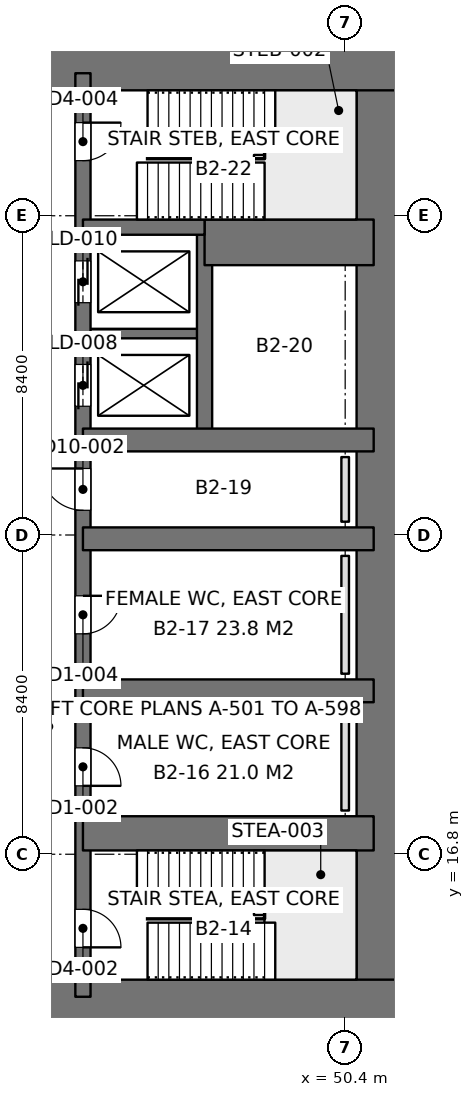
"""IFC4 building model, lengths in metres.
Left out: names, types, materials, properties, quantities, classifications, styles, units other than length and angle.
Written with IfcOpenShell. Run it as: python <this file> out.ifc"""

import sys

from ifc_helpers import new_model, si_unit, direction, frame, frame_2d, origin, place, context, subcontext, project, spatial, rectangle, extrude, element, fill, save


model = new_model("IFC4")
c1 = context("Model", 3, precision=1e-05, world=origin(), true_north=direction((0.0, 1.0)))
c2 = subcontext(c1, "Body", "Model", "MODEL_VIEW")
j1 = project(units=[si_unit("LENGTHUNIT", "METRE"), si_unit("PLANEANGLEUNIT", "RADIAN")], contexts=[c1])
p1 = place(None, origin())
s1 = spatial("IfcSite", under=j1, at=p1, CompositionType="ELEMENT")
p2 = place(p1, origin())
s2 = spatial("IfcBuilding", under=s1, at=p2, CompositionType="ELEMENT")
p3 = place(p2, frame((0.0, 0.0, -8.4)))
s3 = spatial("IfcBuildingStorey", under=s2, at=p3, CompositionType="ELEMENT", Elevation=-8.4)
p4 = place(p3, frame((33.0, 12.75, 0.0), z_axis=(0.0, 0.0, 1.0), x_axis=(1.0, 0.0, 0.0)))
e1 = element("IfcWall", 1, at=p4, inside=s3, PredefinedType="SHEAR", context=c2, shape_type="SweptSolid", body=[
    extrude(rectangle(XDim=19.2, YDim=1.5, at=frame_2d((9.6, 0.0))), origin(), (0.0, 0.0, 1.0), 4.2),
])
p5 = place(p4, frame((7.85, 0.0, 0.0)))
e2 = element("IfcOpeningElement", 2, at=p5, cuts=e1, PredefinedType="OPENING", context=c2, shape_type="SweptSolid", body=[
    extrude(rectangle(XDim=1.8, YDim=2.4, at=frame_2d((0.9, 1.2))), frame((0.0, 0.76, 0.0), z_axis=(0.0, -1.0, 0.0), x_axis=(1.0, 0.0, 0.0)), (0.0, 0.0, 1.0), 1.52),
])
p6 = place(p3, frame((33.0, 37.65, 0.0), z_axis=(0.0, 0.0, 1.0), x_axis=(1.0, 0.0, 0.0)))
e3 = element("IfcWall", 3, at=p6, inside=s3, PredefinedType="SHEAR", context=c2, shape_type="SweptSolid", body=[
    extrude(rectangle(XDim=19.2, YDim=1.5, at=frame_2d((9.6, 0.0))), origin(), (0.0, 0.0, 1.0), 4.2),
])
p7 = place(p6, frame((7.85, 0.0, 0.0)))
e4 = element("IfcOpeningElement", 4, at=p7, cuts=e3, PredefinedType="OPENING", context=c2, shape_type="SweptSolid", body=[
    extrude(rectangle(XDim=1.8, YDim=2.4, at=frame_2d((0.9, 1.2))), frame((0.0, 0.76, 0.0), z_axis=(0.0, -1.0, 0.0), x_axis=(1.0, 0.0, 0.0)), (0.0, 0.0, 1.0), 1.52),
])
p8 = place(p3, frame((51.45, 12.75, 0.0), z_axis=(0.0, 0.0, 1.0), x_axis=(0.0, 1.0, 0.0)))
e5 = element("IfcWall", 5, at=p8, inside=s3, PredefinedType="SHEAR", context=c2, shape_type="SweptSolid", body=[
    extrude(rectangle(XDim=24.9, YDim=1.5, at=frame_2d((12.45, 0.0))), origin(), (0.0, 0.0, 1.0), 4.2),
])
p9 = place(p3, frame((43.5, 13.05, 0.0), z_axis=(0.0, 0.0, 1.0), x_axis=(0.0, 1.0, 0.0)))
e6 = element("IfcWall", 6, at=p9, inside=s3, PredefinedType="SHEAR", context=c2, shape_type="SweptSolid", body=[
    extrude(rectangle(XDim=24.3, YDim=0.4, at=frame_2d((12.15, 0.0))), origin(), (0.0, 0.0, 1.0), 4.2),
])
p10 = place(p9, frame((1.3, 0.0, 0.0)))
e7 = element("IfcOpeningElement", 7, at=p10, cuts=e6, PredefinedType="OPENING", context=c2, shape_type="SweptSolid", body=[
    extrude(rectangle(XDim=1.0, YDim=2.2, at=frame_2d((0.5, 1.1))), frame((0.0, 0.21, 0.0), z_axis=(0.0, -1.0, 0.0), x_axis=(1.0, 0.0, 0.0)), (0.0, 0.0, 1.0), 0.42),
])
p11 = place(p9, frame((22.0, 0.0, 0.0)))
e8 = element("IfcOpeningElement", 8, at=p11, cuts=e6, PredefinedType="OPENING", context=c2, shape_type="SweptSolid", body=[
    extrude(rectangle(XDim=1.0, YDim=2.2, at=frame_2d((0.5, 1.1))), frame((0.0, 0.21, 0.0), z_axis=(0.0, -1.0, 0.0), x_axis=(1.0, 0.0, 0.0)), (0.0, 0.0, 1.0), 0.42),
])
p12 = place(p9, frame((5.55, 0.0, 0.0)))
e9 = element("IfcOpeningElement", 9, at=p12, cuts=e6, PredefinedType="OPENING", context=c2, shape_type="SweptSolid", body=[
    extrude(rectangle(XDim=1.0, YDim=2.2, at=frame_2d((0.5, 1.1))), frame((0.0, 0.21, 0.0), z_axis=(0.0, -1.0, 0.0), x_axis=(1.0, 0.0, 0.0)), (0.0, 0.0, 1.0), 0.42),
])
p13 = place(p9, frame((9.55, 0.0, 0.0)))
e10 = element("IfcOpeningElement", 10, at=p13, cuts=e6, PredefinedType="OPENING", context=c2, shape_type="SweptSolid", body=[
    extrude(rectangle(XDim=1.0, YDim=2.2, at=frame_2d((0.5, 1.1))), frame((0.0, 0.21, 0.0), z_axis=(0.0, -1.0, 0.0), x_axis=(1.0, 0.0, 0.0)), (0.0, 0.0, 1.0), 0.42),
])
p14 = place(p9, frame((12.8, 0.0, 0.0)))
e11 = element("IfcOpeningElement", 11, at=p14, cuts=e6, PredefinedType="OPENING", context=c2, shape_type="SweptSolid", body=[
    extrude(rectangle(XDim=1.1, YDim=2.2, at=frame_2d((0.55, 1.1))), frame((0.0, 0.21, 0.0), z_axis=(0.0, -1.0, 0.0), x_axis=(1.0, 0.0, 0.0)), (0.0, 0.0, 1.0), 0.42),
])
p15 = place(p9, frame((15.538, 0.0, 0.0)))
e12 = element("IfcOpeningElement", 12, at=p15, cuts=e6, PredefinedType="OPENING", context=c2, shape_type="SweptSolid", body=[
    extrude(rectangle(XDim=1.1, YDim=2.2, at=frame_2d((0.55, 1.1))), frame((0.0, 0.21, 0.0), z_axis=(0.0, -1.0, 0.0), x_axis=(1.0, 0.0, 0.0)), (0.0, 0.0, 1.0), 0.42),
])
p16 = place(p9, frame((18.262, 0.0, 0.0)))
e13 = element("IfcOpeningElement", 13, at=p16, cuts=e6, PredefinedType="OPENING", context=c2, shape_type="SweptSolid", body=[
    extrude(rectangle(XDim=1.1, YDim=2.2, at=frame_2d((0.55, 1.1))), frame((0.0, 0.21, 0.0), z_axis=(0.0, -1.0, 0.0), x_axis=(1.0, 0.0, 0.0)), (0.0, 0.0, 1.0), 0.42),
])
p17 = place(p3, frame((51.15, 17.35, 0.0), z_axis=(0.0, 0.0, 1.0), x_axis=(-1.0, 0.0, 0.0)))
e14 = element("IfcWall", 14, at=p17, inside=s3, PredefinedType="SHEAR", context=c2, shape_type="SweptSolid", body=[
    extrude(rectangle(XDim=7.65, YDim=0.9, at=frame_2d((3.825, 0.0))), origin(), (0.0, 0.0, 1.0), 4.2),
])
for number, where, z_axis, x_axis in (
    (15, (51.15, 21.1, 0.0), (0.0, 0.0, 1.0), (-1.0, 0.0, 0.0)),
    (16, (51.15, 25.1, 0.0), (0.0, 0.0, 1.0), (-1.0, 0.0, 0.0)),
    (17, (51.15, 27.7, 0.0), (0.0, 0.0, 1.0), (-1.0, 0.0, 0.0)),
):
    element("IfcWall", number, at=place(p3, frame(where, z_axis=z_axis, x_axis=x_axis)), inside=s3, PredefinedType="SHEAR", context=c2, shape_type="SweptSolid", body=[
        extrude(rectangle(XDim=7.65, YDim=0.6, at=frame_2d((3.825, 0.0))), origin(), (0.0, 0.0, 1.0), 4.2),
    ])
p18 = place(p3, frame((51.15, 32.9, 0.0), z_axis=(0.0, 0.0, 1.0), x_axis=(-1.0, 0.0, 0.0)))
e18 = element("IfcWall", 18, at=p18, inside=s3, PredefinedType="SHEAR", context=c2, shape_type="SweptSolid", body=[
    extrude(rectangle(XDim=4.45, YDim=1.2, at=frame_2d((2.225, 0.0))), origin(), (0.0, 0.0, 1.0), 4.2),
])
p19 = place(p3, frame((46.7, 33.3, 0.0), z_axis=(0.0, 0.0, 1.0), x_axis=(-1.0, 0.0, 0.0)))
e19 = element("IfcWall", 19, at=p19, inside=s3, PredefinedType="SHEAR", context=c2, shape_type="SweptSolid", body=[
    extrude(rectangle(XDim=3.2, YDim=0.4, at=frame_2d((1.6, 0.0))), origin(), (0.0, 0.0, 1.0), 4.2),
])
p20 = place(p3, frame((46.7, 27.7, 0.0), z_axis=(0.0, 0.0, 1.0), x_axis=(0.0, 1.0, 0.0)))
e20 = element("IfcWall", 20, at=p20, inside=s3, PredefinedType="SHEAR", context=c2, shape_type="SweptSolid", body=[
    extrude(rectangle(XDim=5.6, YDim=0.4, at=frame_2d((2.8, 0.0))), origin(), (0.0, 0.0, 1.0), 4.2),
])
p21 = place(p3, frame((46.7, 30.5, 0.0), z_axis=(0.0, 0.0, 1.0), x_axis=(-1.0, 0.0, 0.0)))
e21 = element("IfcWall", 21, at=p21, inside=s3, PredefinedType="SHEAR", context=c2, shape_type="SweptSolid", body=[
    extrude(rectangle(XDim=3.2, YDim=0.25, at=frame_2d((1.6, 0.0))), origin(), (0.0, 0.0, 1.0), 4.2),
])
p22 = place(p3, frame((51.15, 9.049, 0.0), z_axis=(0.0, 0.0, 1.0), x_axis=(0.0, 1.0, 0.0)))
e22 = element("IfcWall", 22, at=p22, inside=s3, PredefinedType="PARTITIONING", context=c2, shape_type="SweptSolid", body=[
    extrude(rectangle(XDim=3.531, YDim=0.25, at=frame_2d((1.766, 0.0))), origin(), (0.0, 0.0, 1.0), 3.85),
])
p23 = place(p22, frame((1.001, 0.0, 0.0)))
e23 = element("IfcOpeningElement", 23, at=p23, cuts=e22, PredefinedType="OPENING", context=c2, shape_type="SweptSolid", body=[
    extrude(rectangle(XDim=0.9, YDim=2.2, at=frame_2d((0.45, 1.1))), frame((0.0, 0.135, 0.0), z_axis=(0.0, -1.0, 0.0), x_axis=(1.0, 0.0, 0.0)), (0.0, 0.0, 1.0), 0.27),
])
p24 = place(p3, frame((51.15, 37.82, 0.0), z_axis=(0.0, 0.0, 1.0), x_axis=(0.0, 1.0, 0.0)))
e24 = element("IfcWall", 24, at=p24, inside=s3, PredefinedType="PARTITIONING", context=c2, shape_type="SweptSolid", body=[
    extrude(rectangle(XDim=3.531, YDim=0.25, at=frame_2d((1.766, 0.0))), origin(), (0.0, 0.0, 1.0), 3.85),
])
p25 = place(p3, frame((50.4, 17.95, 0.0), z_axis=(0.0, 0.0, 1.0), x_axis=(0.0, 1.0, 0.0)))
e25 = element("IfcWall", 25, at=p25, inside=s3, PredefinedType="PLUMBINGWALL", context=c2, shape_type="SweptSolid", body=[
    extrude(rectangle(XDim=2.7, YDim=0.2, at=frame_2d((1.35, 0.0))), origin(), (0.0, 0.0, 1.0), 1.2),
])
p26 = place(p3, frame((50.4, 21.55, 0.0), z_axis=(0.0, 0.0, 1.0), x_axis=(0.0, 1.0, 0.0)))
e26 = element("IfcWall", 26, at=p26, inside=s3, PredefinedType="PLUMBINGWALL", context=c2, shape_type="SweptSolid", body=[
    extrude(rectangle(XDim=3.1, YDim=0.2, at=frame_2d((1.55, 0.0))), origin(), (0.0, 0.0, 1.0), 1.2),
])
p27 = place(p3, frame((50.4, 25.55, 0.0), z_axis=(0.0, 0.0, 1.0), x_axis=(0.0, 1.0, 0.0)))
e27 = element("IfcWall", 27, at=p27, inside=s3, PredefinedType="PLUMBINGWALL", context=c2, shape_type="SweptSolid", body=[
    extrude(rectangle(XDim=1.7, YDim=0.2, at=frame_2d((0.85, 0.0))), origin(), (0.0, 0.0, 1.0), 1.2),
])
p28 = place(p10, frame((1.0, 0.0, 0.0), z_axis=(0.0, 0.0, 1.0), x_axis=(-1.0, 0.0, 0.0)))
e28 = element("IfcDoor", 28, at=p28, inside=s3, OperationType="SINGLE_SWING_RIGHT", PredefinedType="DOOR", context=c2, shape_type="SweptSolid", body=[
    extrude(rectangle(XDim=1.0, YDim=2.2, at=frame_2d((0.5, 1.1))), frame((0.0, 0.025, 0.0), z_axis=(0.0, -1.0, 0.0), x_axis=(1.0, 0.0, 0.0)), (0.0, 0.0, 1.0), 0.05),
])
fill(e7, e28)
p29 = place(p11, frame((1.0, 0.0, 0.0), z_axis=(0.0, 0.0, 1.0), x_axis=(-1.0, 0.0, 0.0)))
e29 = element("IfcDoor", 29, at=p29, inside=s3, OperationType="SINGLE_SWING_LEFT", PredefinedType="DOOR", context=c2, shape_type="SweptSolid", body=[
    extrude(rectangle(XDim=1.0, YDim=2.2, at=frame_2d((0.5, 1.1))), frame((0.0, 0.025, 0.0), z_axis=(0.0, -1.0, 0.0), x_axis=(1.0, 0.0, 0.0)), (0.0, 0.0, 1.0), 0.05),
])
fill(e8, e29)
p30 = place(p12, frame((1.0, 0.0, 0.0), z_axis=(0.0, 0.0, 1.0), x_axis=(-1.0, 0.0, 0.0)))
e30 = element("IfcDoor", 30, at=p30, inside=s3, OperationType="SINGLE_SWING_RIGHT", PredefinedType="DOOR", context=c2, shape_type="SweptSolid", body=[
    extrude(rectangle(XDim=1.0, YDim=2.2, at=frame_2d((0.5, 1.1))), frame((0.0, 0.025, 0.0), z_axis=(0.0, -1.0, 0.0), x_axis=(1.0, 0.0, 0.0)), (0.0, 0.0, 1.0), 0.05),
])
fill(e9, e30)
p31 = place(p13, frame((1.0, 0.0, 0.0), z_axis=(0.0, 0.0, 1.0), x_axis=(-1.0, 0.0, 0.0)))
e31 = element("IfcDoor", 31, at=p31, inside=s3, OperationType="SINGLE_SWING_LEFT", PredefinedType="DOOR", context=c2, shape_type="SweptSolid", body=[
    extrude(rectangle(XDim=1.0, YDim=2.2, at=frame_2d((0.5, 1.1))), frame((0.0, 0.025, 0.0), z_axis=(0.0, -1.0, 0.0), x_axis=(1.0, 0.0, 0.0)), (0.0, 0.0, 1.0), 0.05),
])
fill(e10, e31)
p32 = place(p14, origin())
e32 = element("IfcDoor", 32, at=p32, inside=s3, OperationType="SINGLE_SWING_RIGHT", PredefinedType="DOOR", context=c2, shape_type="SweptSolid", body=[
    extrude(rectangle(XDim=1.1, YDim=2.2, at=frame_2d((0.55, 1.1))), frame((0.0, 0.025, 0.0), z_axis=(0.0, -1.0, 0.0), x_axis=(1.0, 0.0, 0.0)), (0.0, 0.0, 1.0), 0.05),
])
fill(e11, e32)
p33 = place(p15, origin())
e33 = element("IfcDoor", 33, at=p33, inside=s3, OperationType="DOUBLE_DOOR_SLIDING", PredefinedType="DOOR", context=c2, shape_type="SweptSolid", body=[
    extrude(rectangle(XDim=1.1, YDim=2.2, at=frame_2d((0.55, 1.1))), frame((0.0, 0.025, 0.0), z_axis=(0.0, -1.0, 0.0), x_axis=(1.0, 0.0, 0.0)), (0.0, 0.0, 1.0), 0.05),
])
fill(e12, e33)
p34 = place(p16, origin())
e34 = element("IfcDoor", 34, at=p34, inside=s3, OperationType="DOUBLE_DOOR_SLIDING", PredefinedType="DOOR", context=c2, shape_type="SweptSolid", body=[
    extrude(rectangle(XDim=1.1, YDim=2.2, at=frame_2d((0.55, 1.1))), frame((0.0, 0.025, 0.0), z_axis=(0.0, -1.0, 0.0), x_axis=(1.0, 0.0, 0.0)), (0.0, 0.0, 1.0), 0.05),
])
fill(e13, e34)
save(model, sys.argv[1])
